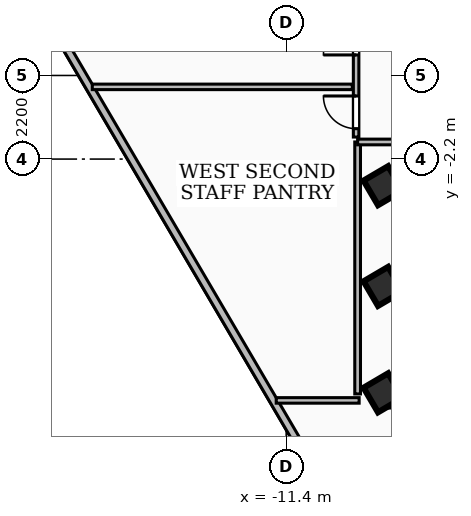
"""IFC4 building model, lengths in metres.
Left out: names, types, materials, properties, quantities, classifications, styles, units other than length and angle.
Written with IfcOpenShell. Run it as: python <this file> out.ifc"""

import sys

from ifc_helpers import new_model, si_unit, direction, frame, frame_2d, origin, origin_2d, place, context, subcontext, project, spatial, rectangle, extrude, element, fill, save


model = new_model("IFC4")
c1 = context("Model", 3, precision=1e-05, world=origin(), true_north=direction((0.0, 1.0)))
c2 = subcontext(c1, "Body", "Model", "MODEL_VIEW")
j1 = project(units=[si_unit("LENGTHUNIT", "METRE"), si_unit("PLANEANGLEUNIT", "RADIAN")], contexts=[c1])
p1 = place(None, origin())
s1 = spatial("IfcSite", under=j1, at=p1, CompositionType="ELEMENT")
p2 = place(p1, origin())
s2 = spatial("IfcBuilding", under=s1, at=p2, CompositionType="ELEMENT")
p3 = place(p2, frame((0.0, 0.0, 212.04)))
s3 = spatial("IfcBuildingStorey", under=s2, at=p3, CompositionType="ELEMENT", Elevation=212.04)
p4 = place(p3, frame((8.78, -8.51, 0.0), z_axis=(0.0, 0.0, 1.0), x_axis=(-1.0, 0.0, 0.0)))
e1 = element("IfcWall", 1, at=p4, inside=s3, PredefinedType="SHEAR", context=c2, shape_type="SweptSolid", body=[
    extrude(rectangle(XDim=17.56, YDim=0.4, at=frame_2d((8.78, 0.0))), origin(), (0.0, 0.0, 1.0), 3.16),
])
for number, where, z_axis, x_axis in (
    (2, (-8.85, -5.55, 0.0), (0.0, 0.0, 1.0), (0.863, 0.506, 0.0)),
    (3, (-8.85, -2.9, 0.0), (0.0, 0.0, 1.0), (0.863, 0.506, 0.0)),
    (4, (-8.85, -8.35, 0.0), (0.0, 0.0, 1.0), (0.863, 0.506, 0.0)),
):
    element("IfcColumn", number, at=place(p3, frame(where, z_axis=z_axis, x_axis=x_axis)), inside=s3, PredefinedType="COLUMN", context=c2, shape_type="SweptSolid", body=[
        extrude(rectangle(XDim=0.75, YDim=0.75, at=origin_2d()), origin(), (0.0, 0.0, 1.0), 3.42),
    ])
p5 = place(p3, frame((-5.904, -18.492, 0.0), z_axis=(0.0, 0.0, 1.0), x_axis=(-0.506046465446, 0.862506217258, 0.0)))
e5 = element("IfcWall", 5, at=p5, inside=s3, PredefinedType="SOLIDWALL", context=c2, shape_type="SweptSolid", body=[
    extrude(rectangle(XDim=25.924, YDim=0.2, at=frame_2d((12.962, 0.0))), origin(), (0.0, 0.0, 1.0), 3.16),
])
p6 = place(p5, frame((0.85, 0.0, 0.85)))
e6 = element("IfcOpeningElement", 6, at=p6, cuts=e5, PredefinedType="OPENING", context=c2, shape_type="SweptSolid", body=[
    extrude(rectangle(XDim=2.4, YDim=1.85, at=frame_2d((1.2, 0.925))), frame((0.0, 0.11, 0.0), z_axis=(0.0, -1.0, 0.0), x_axis=(1.0, 0.0, 0.0)), (0.0, 0.0, 1.0), 0.22),
])
p7 = place(p3, frame((-9.52, -8.38, 0.0), z_axis=(0.0, 0.0, 1.0), x_axis=(0.0, 1.0, 0.0)))
e7 = element("IfcWall", 7, at=p7, inside=s3, PredefinedType="PARTITIONING", context=c2, shape_type="SweptSolid", body=[
    extrude(rectangle(XDim=6.63, YDim=0.15, at=frame_2d((3.315, 0.0))), origin(), (0.0, 0.0, 1.0), 3.16),
])
p8 = place(p3, frame((-7.85, -1.75, 0.0), z_axis=(0.0, 0.0, 1.0), x_axis=(-1.0, 0.0, 0.0)))
e8 = element("IfcWall", 8, at=p8, inside=s3, PredefinedType="PARTITIONING", context=c2, shape_type="SweptSolid", body=[
    extrude(rectangle(XDim=1.67, YDim=0.15, at=frame_2d((0.835, 0.0))), origin(), (0.0, 0.0, 1.0), 2.39),
])
p9 = place(p3, frame((-16.502, -0.3, 0.0), z_axis=(0.0, 0.0, 1.0), x_axis=(1.0, 0.0, 0.0)))
e9 = element("IfcWall", 9, at=p9, inside=s3, PredefinedType="PARTITIONING", context=c2, shape_type="SweptSolid", body=[
    extrude(rectangle(XDim=6.842, YDim=0.145, at=frame_2d((3.421, 0.0))), origin(), (0.0, 0.0, 1.0), 3.16),
])
p10 = place(p3, frame((-11.662, -8.55, 0.0), z_axis=(0.0, 0.0, 1.0), x_axis=(1.0, 0.0, 0.0)))
e10 = element("IfcWall", 10, at=p10, inside=s3, PredefinedType="PARTITIONING", context=c2, shape_type="SweptSolid", body=[
    extrude(rectangle(XDim=2.182, YDim=0.145, at=frame_2d((1.091, 0.0))), origin(), (0.0, 0.0, 1.0), 3.16),
])
p11 = place(p3, frame((-9.56, -1.62, 0.0), z_axis=(0.0, 0.0, 1.0), x_axis=(0.0, 1.0, 0.0)))
e11 = element("IfcWall", 11, at=p11, inside=s3, PredefinedType="PARTITIONING", context=c2, shape_type="SweptSolid", body=[
    extrude(rectangle(XDim=3.24, YDim=0.145, at=frame_2d((1.62, 0.0))), origin(), (0.0, 0.0, 1.0), 3.16),
])
p12 = place(p11, frame((0.22, 0.0, 0.0)))
e12 = element("IfcOpeningElement", 12, at=p12, cuts=e11, PredefinedType="OPENING", context=c2, shape_type="SweptSolid", body=[
    extrude(rectangle(XDim=0.86, YDim=2.04, at=frame_2d((0.43, 1.02))), frame((0.0, 0.083, 0.0), z_axis=(0.0, -1.0, 0.0), x_axis=(1.0, 0.0, 0.0)), (0.0, 0.0, 1.0), 0.165),
])
p13 = place(p11, frame((2.16, 0.0, 0.0)))
e13 = element("IfcOpeningElement", 13, at=p13, cuts=e11, PredefinedType="OPENING", context=c2, shape_type="SweptSolid", body=[
    extrude(rectangle(XDim=0.86, YDim=2.04, at=frame_2d((0.43, 1.02))), frame((0.0, 0.083, 0.0), z_axis=(0.0, -1.0, 0.0), x_axis=(1.0, 0.0, 0.0)), (0.0, 0.0, 1.0), 0.165),
])
p14 = place(p12, origin())
e14 = element("IfcDoor", 14, at=p14, inside=s3, OperationType="SINGLE_SWING_RIGHT", PredefinedType="DOOR", context=c2, shape_type="SweptSolid", body=[
    extrude(rectangle(XDim=0.86, YDim=2.04, at=frame_2d((0.43, 1.02))), frame((0.0, 0.025, 0.0), z_axis=(0.0, -1.0, 0.0), x_axis=(1.0, 0.0, 0.0)), (0.0, 0.0, 1.0), 0.05),
])
fill(e12, e14)
p15 = place(p13, origin())
e15 = element("IfcDoor", 15, at=p15, inside=s3, OperationType="SINGLE_SWING_LEFT", PredefinedType="DOOR", context=c2, shape_type="SweptSolid", body=[
    extrude(rectangle(XDim=0.86, YDim=2.04, at=frame_2d((0.43, 1.02))), frame((0.0, 0.025, 0.0), z_axis=(0.0, -1.0, 0.0), x_axis=(1.0, 0.0, 0.0)), (0.0, 0.0, 1.0), 0.05),
])
fill(e13, e15)
save(model, sys.argv[1])
